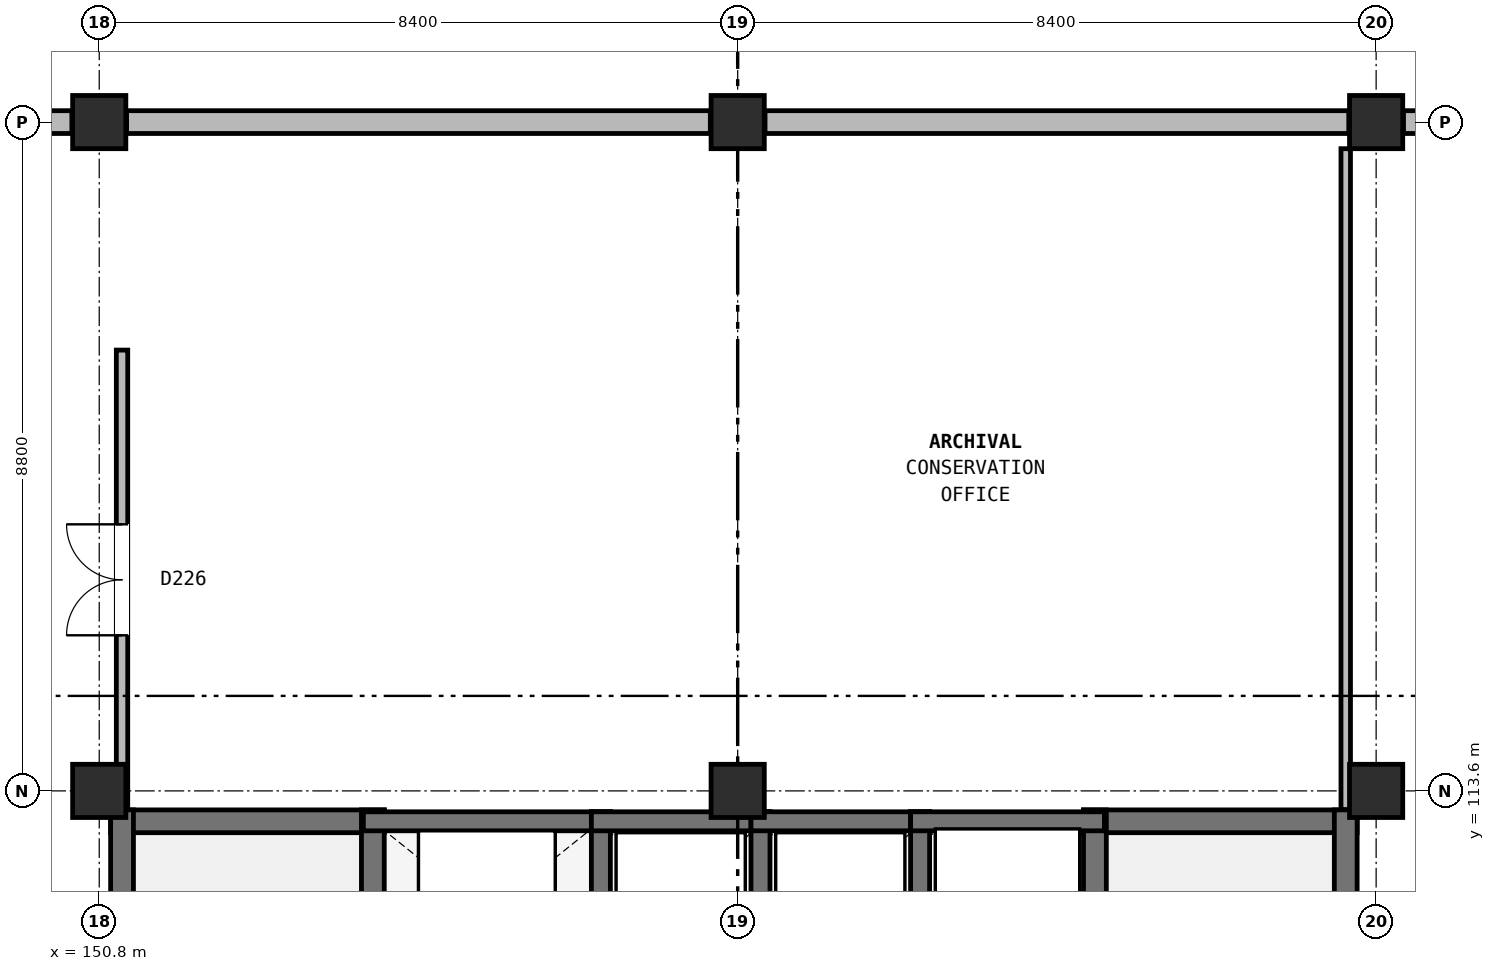
"""IFC4 building model, lengths in metres.
Left out: names, types, materials, properties, quantities, classifications, styles, units other than length and angle.
Written with IfcOpenShell. Run it as: python <this file> out.ifc"""

import sys

from ifc_helpers import new_model, si_unit, direction, frame, frame_2d, origin, origin_2d, place, context, subcontext, project, spatial, rectangle, extrude, element, fill, save


model = new_model("IFC4")
c1 = context("Model", 3, precision=1e-05, world=origin(), true_north=direction((0.0, 1.0)))
c2 = subcontext(c1, "Body", "Model", "MODEL_VIEW")
j1 = project(units=[si_unit("LENGTHUNIT", "METRE"), si_unit("PLANEANGLEUNIT", "RADIAN")], contexts=[c1])
p1 = place(None, origin())
s1 = spatial("IfcSite", under=j1, at=p1, CompositionType="ELEMENT")
p2 = place(p1, origin())
s2 = spatial("IfcBuilding", under=s1, at=p2, CompositionType="ELEMENT")
p3 = place(p2, frame((0.0, 0.0, 28.8)))
s3 = spatial("IfcBuildingStorey", under=s2, at=p3, CompositionType="ELEMENT", Elevation=28.8)
for number, where, z_axis, x_axis in (
    (1, (150.8, 113.6, 0.0), (0.0, 0.0, 1.0), (1.0, 0.0, 0.0)),
    (2, (150.8, 122.4, 0.0), (0.0, 0.0, 1.0), (1.0, 0.0, 0.0)),
    (3, (159.2, 113.6, 0.0), (0.0, 0.0, 1.0), (1.0, 0.0, 0.0)),
    (4, (159.2, 122.4, 0.0), (0.0, 0.0, 1.0), (1.0, 0.0, 0.0)),
    (5, (167.6, 113.6, 0.0), (0.0, 0.0, 1.0), (1.0, 0.0, 0.0)),
    (6, (167.6, 122.4, 0.0), (0.0, 0.0, 1.0), (1.0, 0.0, 0.0)),
):
    element("IfcColumn", number, at=place(p3, frame(where, z_axis=z_axis, x_axis=x_axis)), inside=s3, PredefinedType="COLUMN", context=c2, shape_type="SweptSolid", body=[
        extrude(rectangle(XDim=0.7, YDim=0.7, at=origin_2d()), origin(), (0.0, 0.0, 1.0), 4.0),
    ])
p4 = place(p3, frame((175.64, 122.4, 0.0), z_axis=(0.0, 0.0, 1.0), x_axis=(-1.0, 0.0, 0.0)))
e7 = element("IfcWall", 7, at=p4, inside=s3, PredefinedType="SOLIDWALL", context=c2, shape_type="SweptSolid", body=[
    extrude(rectangle(XDim=7.68, YDim=0.3, at=frame_2d((3.84, 0.0))), origin(), (0.0, 0.0, 1.0), 3.15),
])
p5 = place(p4, frame((0.42, 0.0, 0.9)))
e8 = element("IfcOpeningElement", 8, at=p5, cuts=e7, PredefinedType="OPENING", context=c2, shape_type="SweptSolid", body=[
    extrude(rectangle(XDim=3.2, YDim=2.1, at=frame_2d((1.6, 1.05))), frame((0.0, 0.16, 0.0), z_axis=(0.0, -1.0, 0.0), x_axis=(1.0, 0.0, 0.0)), (0.0, 0.0, 1.0), 0.32),
])
p6 = place(p3, frame((167.24, 122.4, 0.0), z_axis=(0.0, 0.0, 1.0), x_axis=(-1.0, 0.0, 0.0)))
e9 = element("IfcWall", 9, at=p6, inside=s3, PredefinedType="SOLIDWALL", context=c2, shape_type="SweptSolid", body=[
    extrude(rectangle(XDim=7.68, YDim=0.3, at=frame_2d((3.84, 0.0))), origin(), (0.0, 0.0, 1.0), 3.15),
])
p7 = place(p3, frame((158.84, 122.4, 0.0), z_axis=(0.0, 0.0, 1.0), x_axis=(-1.0, 0.0, 0.0)))
e10 = element("IfcWall", 10, at=p7, inside=s3, PredefinedType="SOLIDWALL", context=c2, shape_type="SweptSolid", body=[
    extrude(rectangle(XDim=7.68, YDim=0.3, at=frame_2d((3.84, 0.0))), origin(), (0.0, 0.0, 1.0), 3.15),
])
p8 = place(p3, frame((150.44, 122.4, 0.0), z_axis=(0.0, 0.0, 1.0), x_axis=(-1.0, 0.0, 0.0)))
e11 = element("IfcWall", 11, at=p8, inside=s3, PredefinedType="SOLIDWALL", context=c2, shape_type="SweptSolid", body=[
    extrude(rectangle(XDim=7.68, YDim=0.3, at=frame_2d((3.84, 0.0))), origin(), (0.0, 0.0, 1.0), 3.15),
])
p9 = place(p3, frame((150.95, 113.2, 0.0), z_axis=(0.0, 0.0, 1.0), x_axis=(1.0, 0.0, 0.0)))
e12 = element("IfcWall", 12, at=p9, inside=s3, PredefinedType="SHEAR", context=c2, shape_type="SweptSolid", body=[
    extrude(rectangle(XDim=3.6, YDim=0.3, at=frame_2d((1.8, 0.0))), origin(), (0.0, 0.0, 1.0), 4.0),
])
p10 = place(p3, frame((151.1, 105.05, 0.0), z_axis=(0.0, 0.0, 1.0), x_axis=(0.0, 1.0, 0.0)))
e13 = element("IfcWall", 13, at=p10, inside=s3, PredefinedType="SHEAR", context=c2, shape_type="SweptSolid", body=[
    extrude(rectangle(XDim=8.3, YDim=0.3, at=frame_2d((4.15, 0.0))), origin(), (0.0, 0.0, 1.0), 4.0),
])
p11 = place(p3, frame((154.4, 105.05, 0.0), z_axis=(0.0, 0.0, 1.0), x_axis=(0.0, 1.0, 0.0)))
e14 = element("IfcWall", 14, at=p11, inside=s3, PredefinedType="SHEAR", context=c2, shape_type="SweptSolid", body=[
    extrude(rectangle(XDim=8.3, YDim=0.3, at=frame_2d((4.15, 0.0))), origin(), (0.0, 0.0, 1.0), 4.0),
])
p12 = place(p11, frame((0.45, 0.0, 0.0)))
e15 = element("IfcOpeningElement", 15, at=p12, cuts=e14, PredefinedType="OPENING", context=c2, shape_type="SweptSolid", body=[
    extrude(rectangle(XDim=1.1, YDim=2.2, at=frame_2d((0.55, 1.1))), frame((0.0, 0.16, 0.0), z_axis=(0.0, -1.0, 0.0), x_axis=(1.0, 0.0, 0.0)), (0.0, 0.0, 1.0), 0.32),
])
p13 = place(p3, frame((163.75, 113.2, 0.0), z_axis=(0.0, 0.0, 1.0), x_axis=(1.0, 0.0, 0.0)))
e16 = element("IfcWall", 16, at=p13, inside=s3, PredefinedType="SHEAR", context=c2, shape_type="SweptSolid", body=[
    extrude(rectangle(XDim=3.6, YDim=0.3, at=frame_2d((1.8, 0.0))), origin(), (0.0, 0.0, 1.0), 4.0),
])
for number, where, z_axis, x_axis in (
    (17, (163.9, 105.05, 0.0), (0.0, 0.0, 1.0), (0.0, 1.0, 0.0)),
    (18, (167.2, 105.05, 0.0), (0.0, 0.0, 1.0), (0.0, 1.0, 0.0)),
):
    element("IfcWall", number, at=place(p3, frame(where, z_axis=z_axis, x_axis=x_axis)), inside=s3, PredefinedType="SHEAR", context=c2, shape_type="SweptSolid", body=[
        extrude(rectangle(XDim=8.3, YDim=0.3, at=frame_2d((4.15, 0.0))), origin(), (0.0, 0.0, 1.0), 4.0),
    ])
p14 = place(p3, frame((154.275, 113.2, 0.0), z_axis=(0.0, 0.0, 1.0), x_axis=(1.0, 0.0, 0.0)))
e19 = element("IfcWall", 19, at=p14, inside=s3, PredefinedType="SOLIDWALL", context=c2, shape_type="SweptSolid", body=[
    extrude(rectangle(XDim=3.25, YDim=0.25, at=frame_2d((1.625, 0.0))), origin(), (0.0, 0.0, 1.0), 3.68),
])
p15 = place(p3, frame((157.4, 110.675, 0.0), z_axis=(0.0, 0.0, 1.0), x_axis=(0.0, 1.0, 0.0)))
e20 = element("IfcWall", 20, at=p15, inside=s3, PredefinedType="SOLIDWALL", context=c2, shape_type="SweptSolid", body=[
    extrude(rectangle(XDim=2.65, YDim=0.25, at=frame_2d((1.325, 0.0))), origin(), (0.0, 0.0, 1.0), 3.68),
])
p16 = place(p3, frame((157.275, 113.2, 0.0), z_axis=(0.0, 0.0, 1.0), x_axis=(1.0, 0.0, 0.0)))
e21 = element("IfcWall", 21, at=p16, inside=s3, PredefinedType="SOLIDWALL", context=c2, shape_type="SweptSolid", body=[
    extrude(rectangle(XDim=2.35, YDim=0.25, at=frame_2d((1.175, 0.0))), origin(), (0.0, 0.0, 1.0), 3.68),
])
p17 = place(p3, frame((159.5, 110.675, 0.0), z_axis=(0.0, 0.0, 1.0), x_axis=(0.0, 1.0, 0.0)))
e22 = element("IfcWall", 22, at=p17, inside=s3, PredefinedType="SOLIDWALL", context=c2, shape_type="SweptSolid", body=[
    extrude(rectangle(XDim=2.65, YDim=0.25, at=frame_2d((1.325, 0.0))), origin(), (0.0, 0.0, 1.0), 3.68),
])
p18 = place(p3, frame((159.375, 113.2, 0.0), z_axis=(0.0, 0.0, 1.0), x_axis=(1.0, 0.0, 0.0)))
e23 = element("IfcWall", 23, at=p18, inside=s3, PredefinedType="SOLIDWALL", context=c2, shape_type="SweptSolid", body=[
    extrude(rectangle(XDim=2.35, YDim=0.25, at=frame_2d((1.175, 0.0))), origin(), (0.0, 0.0, 1.0), 3.68),
])
p19 = place(p3, frame((161.6, 110.675, 0.0), z_axis=(0.0, 0.0, 1.0), x_axis=(0.0, 1.0, 0.0)))
e24 = element("IfcWall", 24, at=p19, inside=s3, PredefinedType="SOLIDWALL", context=c2, shape_type="SweptSolid", body=[
    extrude(rectangle(XDim=2.65, YDim=0.25, at=frame_2d((1.325, 0.0))), origin(), (0.0, 0.0, 1.0), 3.68),
])
p20 = place(p3, frame((161.475, 113.2, 0.0), z_axis=(0.0, 0.0, 1.0), x_axis=(1.0, 0.0, 0.0)))
e25 = element("IfcWall", 25, at=p20, inside=s3, PredefinedType="SOLIDWALL", context=c2, shape_type="SweptSolid", body=[
    extrude(rectangle(XDim=2.55, YDim=0.25, at=frame_2d((1.275, 0.0))), origin(), (0.0, 0.0, 1.0), 3.68),
])
p21 = place(p3, frame((151.1, 113.355, 0.0), z_axis=(0.0, 0.0, 1.0), x_axis=(0.0, 1.0, 0.0)))
e26 = element("IfcWall", 26, at=p21, inside=s3, PredefinedType="PARTITIONING", context=c2, shape_type="SweptSolid", body=[
    extrude(rectangle(XDim=6.045, YDim=0.15, at=frame_2d((3.022, 0.0))), origin(), (0.0, 0.0, 1.0), 3.145),
])
p22 = place(p21, frame((2.292, 0.0, 0.0)))
e27 = element("IfcOpeningElement", 27, at=p22, cuts=e26, PredefinedType="OPENING", context=c2, shape_type="SweptSolid", body=[
    extrude(rectangle(XDim=1.46, YDim=2.28, at=frame_2d((0.73, 1.14))), frame((0.0, 0.085, 0.0), z_axis=(0.0, -1.0, 0.0), x_axis=(1.0, 0.0, 0.0)), (0.0, 0.0, 1.0), 0.17),
])
p23 = place(p3, frame((167.2, 113.355, 0.0), z_axis=(0.0, 0.0, 1.0), x_axis=(0.0, 1.0, 0.0)))
e28 = element("IfcWall", 28, at=p23, inside=s3, PredefinedType="PARTITIONING", context=c2, shape_type="SweptSolid", body=[
    extrude(rectangle(XDim=8.695, YDim=0.125, at=frame_2d((4.348, 0.0))), origin(), (0.0, 0.0, 1.0), 3.145),
])
p24 = place(p22, origin())
e29 = element("IfcDoor", 29, at=p24, inside=s3, OperationType="DOUBLE_DOOR_SINGLE_SWING", PredefinedType="DOOR", context=c2, shape_type="SweptSolid", body=[
    extrude(rectangle(XDim=1.46, YDim=2.28, at=frame_2d((0.73, 1.14))), frame((0.0, 0.025, 0.0), z_axis=(0.0, -1.0, 0.0), x_axis=(1.0, 0.0, 0.0)), (0.0, 0.0, 1.0), 0.05),
])
fill(e27, e29)
save(model, sys.argv[1])
